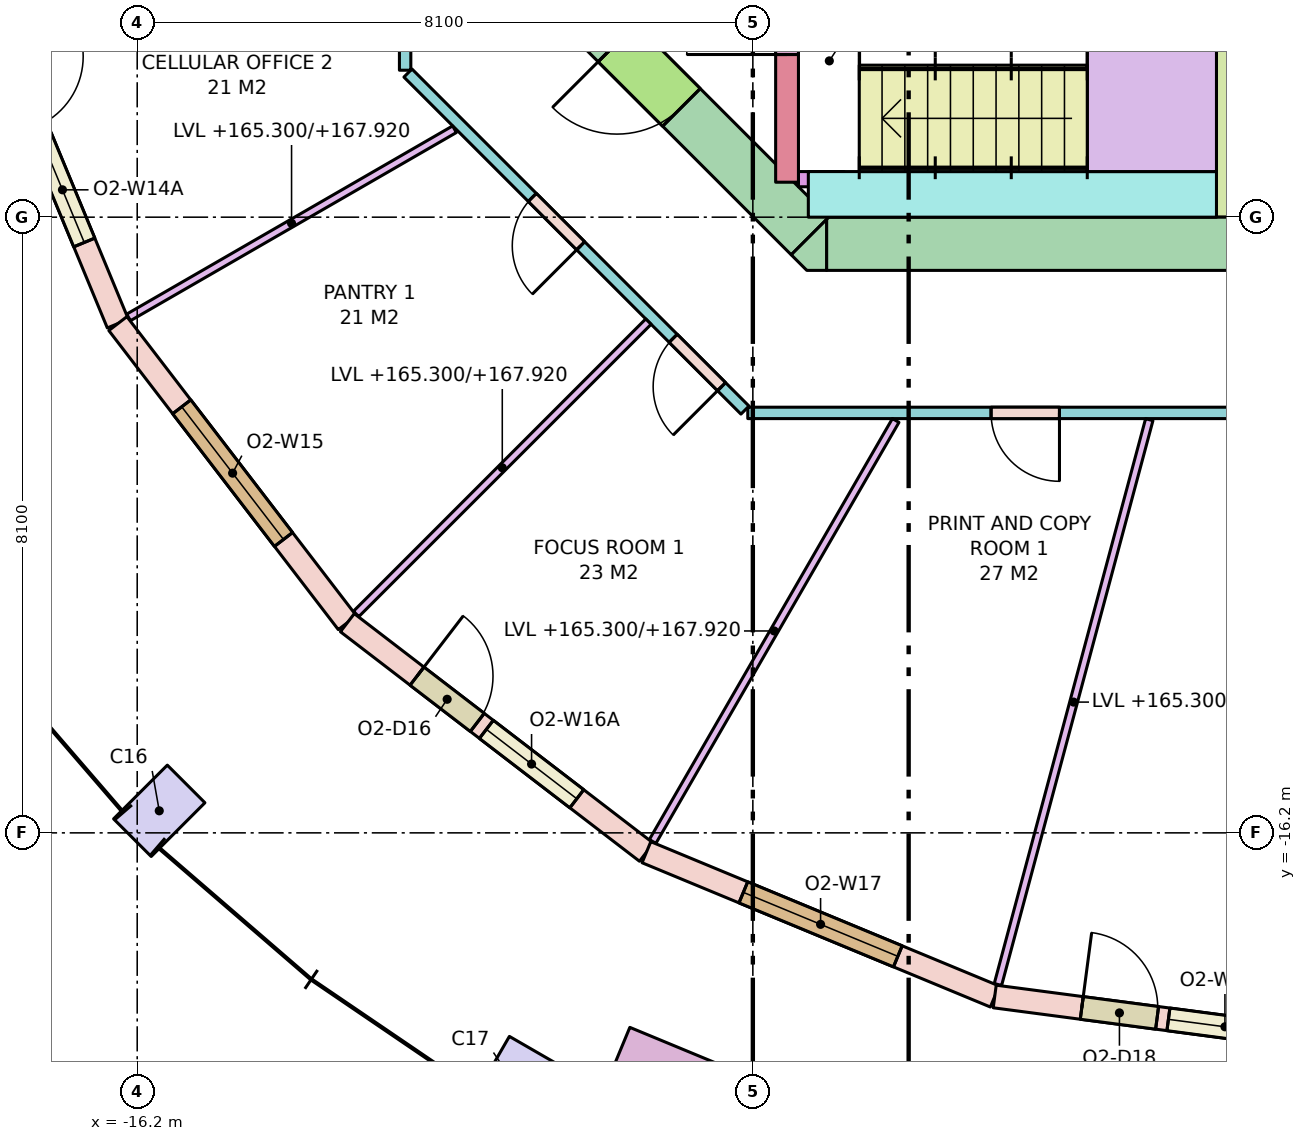
"""IFC4 building model, lengths in metres.
Left out: names, types, materials, properties, quantities, classifications, styles, units other than length and angle.
Written with IfcOpenShell. Run it as: python <this file> out.ifc"""

import sys

from ifc_helpers import new_model, si_unit, direction, frame, frame_2d, origin, origin_2d, place, context, subcontext, project, spatial, polyline, rectangle, outline, extrude, element, fill, save


model = new_model("IFC4")
c1 = context("Model", 3, precision=1e-05, world=origin(), true_north=direction((0.0, 1.0)))
c2 = subcontext(c1, "Body", "Model", "MODEL_VIEW")
j1 = project(units=[si_unit("LENGTHUNIT", "METRE"), si_unit("PLANEANGLEUNIT", "RADIAN")], contexts=[c1])
p1 = place(None, origin())
s1 = spatial("IfcSite", under=j1, at=p1, CompositionType="ELEMENT")
p2 = place(p1, origin())
s2 = spatial("IfcBuilding", under=s1, at=p2, CompositionType="ELEMENT")
p3 = place(p2, frame((0.0, 0.0, 165.3)))
s3 = spatial("IfcBuildingStorey", under=s2, at=p3, CompositionType="ELEMENT", Elevation=165.3)
for number, where, z_axis, x_axis in (
    (1, (-15.91, -15.91, 0.0), (0.0, 0.0, 1.0), (0.707, -0.707, 0.0)),
    (2, (-11.25, -19.486, 0.0), (0.0, 0.0, 1.0), (0.866, -0.5, 0.0)),
):
    element("IfcColumn", number, at=place(p3, frame(where, z_axis=z_axis, x_axis=x_axis)), inside=s3, PredefinedType="COLUMN", context=c2, shape_type="SweptSolid", body=[
        extrude(rectangle(XDim=0.7, YDim=1.0, at=origin_2d()), origin(), (0.0, 0.0, 1.0), 3.7),
    ])
p4 = place(p3, frame((-7.13, -8.45, -0.28), z_axis=(0.0, 0.0, 1.0), x_axis=(1.0, 0.0, 0.0)))
e3 = element("IfcWall", 3, at=p4, inside=s3, PredefinedType="SHEAR", context=c2, shape_type="SweptSolid", body=[
    extrude(rectangle(XDim=14.26, YDim=0.7, at=frame_2d((7.13, 0.0))), origin(), (0.0, 0.0, 1.0), 3.7),
])
p5 = place(p4, frame((8.08, 0.0, 0.28)))
e4 = element("IfcOpeningElement", 4, at=p5, cuts=e3, PredefinedType="OPENING", context=c2, shape_type="SweptSolid", body=[
    extrude(rectangle(XDim=0.7, YDim=2.1, at=frame_2d((0.35, 1.05))), frame((0.0, 0.36, 0.0), z_axis=(0.0, -1.0, 0.0), x_axis=(1.0, 0.0, 0.0)), (0.0, 0.0, 1.0), 0.72),
])
p6 = place(p4, frame((5.58, 0.0, 0.28)))
e5 = element("IfcOpeningElement", 5, at=p6, cuts=e3, PredefinedType="OPENING", context=c2, shape_type="SweptSolid", body=[
    extrude(rectangle(XDim=0.85, YDim=2.1, at=frame_2d((0.425, 1.05))), frame((0.0, 0.36, 0.0), z_axis=(0.0, -1.0, 0.0), x_axis=(1.0, 0.0, 0.0)), (0.0, 0.0, 1.0), 0.72),
])
p7 = place(p4, frame((6.88, 0.0, 0.28)))
e6 = element("IfcOpeningElement", 6, at=p7, cuts=e3, PredefinedType="OPENING", context=c2, shape_type="SweptSolid", body=[
    extrude(rectangle(XDim=0.85, YDim=2.1, at=frame_2d((0.425, 1.05))), frame((0.0, 0.36, 0.0), z_axis=(0.0, -1.0, 0.0), x_axis=(1.0, 0.0, 0.0)), (0.0, 0.0, 1.0), 0.72),
])
p8 = place(p4, frame((9.521, 0.0, 0.28)))
e7 = element("IfcOpeningElement", 7, at=p8, cuts=e3, PredefinedType="OPENING", context=c2, shape_type="SweptSolid", body=[
    extrude(rectangle(XDim=0.9, YDim=2.1, at=frame_2d((0.45, 1.05))), frame((0.0, 0.36, 0.0), z_axis=(0.0, -1.0, 0.0), x_axis=(1.0, 0.0, 0.0)), (0.0, 0.0, 1.0), 0.72),
])
p9 = place(p4, frame((11.278, 0.0, 0.28)))
e8 = element("IfcOpeningElement", 8, at=p9, cuts=e3, PredefinedType="OPENING", context=c2, shape_type="SweptSolid", body=[
    extrude(rectangle(XDim=0.9, YDim=2.1, at=frame_2d((0.45, 1.05))), frame((0.0, 0.36, 0.0), z_axis=(0.0, -1.0, 0.0), x_axis=(1.0, 0.0, 0.0)), (0.0, 0.0, 1.0), 0.72),
])
p10 = place(p4, frame((12.84, 0.0, 0.28)))
e9 = element("IfcOpeningElement", 9, at=p10, cuts=e3, PredefinedType="OPENING", context=c2, shape_type="SweptSolid", body=[
    extrude(rectangle(XDim=0.9, YDim=2.1, at=frame_2d((0.45, 1.05))), frame((0.0, 0.36, 0.0), z_axis=(0.0, -1.0, 0.0), x_axis=(1.0, 0.0, 0.0)), (0.0, 0.0, 1.0), 0.72),
])
p11 = place(p3, frame((-7.347, -8.347, -0.28), z_axis=(0.0, 0.0, 1.0), x_axis=(-0.707106781187, 0.707106781187, 0.0)))
e10 = element("IfcWall", 10, at=p11, inside=s3, PredefinedType="SHEAR", context=c2, shape_type="SweptSolid", body=[
    extrude(rectangle(XDim=4.243, YDim=0.7, at=frame_2d((2.121, 0.0))), origin(), (0.0, 0.0, 1.0), 3.7),
])
p12 = place(p11, frame((2.393, 0.0, 0.28)))
e11 = element("IfcOpeningElement", 11, at=p12, cuts=e10, PredefinedType="OPENING", context=c2, shape_type="SweptSolid", body=[
    extrude(rectangle(XDim=1.2, YDim=2.1, at=frame_2d((0.6, 1.05))), frame((0.0, 0.36, 0.0), z_axis=(0.0, -1.0, 0.0), x_axis=(1.0, 0.0, 0.0)), (0.0, 0.0, 1.0), 0.72),
])
p13 = place(p3, frame((0.0, 0.0, -0.28)))
e12 = element("IfcWall", 12, at=p13, inside=s3, PredefinedType="SHEAR", context=c2, shape_type="SweptSolid", body=[
    extrude(outline(polyline([(-7.39, -8.8), (-7.595, -8.595), (-7.595, -8.595), (-7.595, -8.595), (-7.13, -8.13), (-7.13, -8.8), (-7.13, -8.8), (-7.39, -8.8)])), origin(), (0.0, 0.0, 1.0), 3.7),
])
p14 = place(p3, frame((-1.85, -8.1, 0.0), z_axis=(0.0, 0.0, 1.0), x_axis=(0.0, 1.0, 0.0)))
e13 = element("IfcWall", 13, at=p14, inside=s3, PredefinedType="SHEAR", context=c2, shape_type="SweptSolid", body=[
    extrude(rectangle(XDim=6.6, YDim=0.3, at=frame_2d((3.3, 0.0))), origin(), (0.0, 0.0, 1.0), 3.42),
])
p15 = place(p3, frame((-7.65, -7.64, 0.0), z_axis=(0.0, 0.0, 1.0), x_axis=(0.0, 1.0, 0.0)))
e14 = element("IfcWall", 14, at=p15, inside=s3, PredefinedType="SHEAR", context=c2, shape_type="SweptSolid", body=[
    extrude(rectangle(XDim=3.14, YDim=0.3, at=frame_2d((1.57, 0.0))), origin(), (0.0, 0.0, 1.0), 3.42),
])
p16 = place(p15, frame((1.68, 0.0, 0.0)))
e15 = element("IfcOpeningElement", 15, at=p16, cuts=e14, PredefinedType="OPENING", context=c2, shape_type="SweptSolid", body=[
    extrude(rectangle(XDim=1.32, YDim=2.1, at=frame_2d((0.66, 1.05))), frame((0.0, 0.16, 0.0), z_axis=(0.0, -1.0, 0.0), x_axis=(1.0, 0.0, 0.0)), (0.0, 0.0, 1.0), 0.32),
])
p17 = place(p3, frame((-7.5, -7.6, 0.0), z_axis=(0.0, 0.0, 1.0), x_axis=(1.0, 0.0, 0.0)))
e16 = element("IfcWall", 16, at=p17, inside=s3, PredefinedType="SHEAR", context=c2, shape_type="SweptSolid", body=[
    extrude(rectangle(XDim=0.6, YDim=0.2, at=frame_2d((0.3, 0.0))), origin(), (0.0, 0.0, 1.0), 3.42),
])
p18 = place(p3, frame((-7.37, -7.8, 0.0), z_axis=(0.0, 0.0, 1.0), x_axis=(1.0, 0.0, 0.0)))
e17 = element("IfcWall", 17, at=p18, inside=s3, PredefinedType="SHEAR", context=c2, shape_type="SweptSolid", body=[
    extrude(rectangle(XDim=5.37, YDim=0.6, at=frame_2d((2.685, 0.0))), origin(), (0.0, 0.0, 1.0), 3.42),
])
p19 = place(p3, frame((-18.353, -4.917, 0.0), z_axis=(0.0, 0.0, 1.0), x_axis=(0.382650301762, -0.923893254961, 0.0)))
e18 = element("IfcWall", 18, at=p19, inside=s3, PredefinedType="STANDARD", context=c2, shape_type="SweptSolid", body=[
    extrude(rectangle(XDim=4.96, YDim=0.3, at=frame_2d((2.48, 0.0))), origin(), (0.0, 0.0, 1.0), 3.42),
])
p20 = place(p19, frame((1.155, 0.0, 0.0)))
e19 = element("IfcOpeningElement", 19, at=p20, cuts=e18, PredefinedType="OPENING", context=c2, shape_type="SweptSolid", body=[
    extrude(rectangle(XDim=1.0, YDim=2.4, at=frame_2d((0.5, 1.2))), frame((0.0, 0.16, 0.0), z_axis=(0.0, -1.0, 0.0), x_axis=(1.0, 0.0, 0.0)), (0.0, 0.0, 1.0), 0.32),
])
p21 = place(p19, frame((2.305, 0.0, 0.8)))
e20 = element("IfcOpeningElement", 20, at=p21, cuts=e18, PredefinedType="OPENING", context=c2, shape_type="SweptSolid", body=[
    extrude(rectangle(XDim=1.5, YDim=2.4, at=frame_2d((0.75, 1.2))), frame((0.0, 0.16, 0.0), z_axis=(0.0, -1.0, 0.0), x_axis=(1.0, 0.0, 0.0)), (0.0, 0.0, 1.0), 0.32),
])
p22 = place(p3, frame((-16.455, -9.5, 0.0), z_axis=(0.0, 0.0, 1.0), x_axis=(0.608768356425, -0.793348024649, 0.0)))
e21 = element("IfcWall", 21, at=p22, inside=s3, PredefinedType="STANDARD", context=c2, shape_type="SweptSolid", body=[
    extrude(rectangle(XDim=4.96, YDim=0.3, at=frame_2d((2.48, 0.0))), origin(), (0.0, 0.0, 1.0), 3.42),
])
p23 = place(p22, frame((1.38, 0.0, 0.8)))
e22 = element("IfcOpeningElement", 22, at=p23, cuts=e21, PredefinedType="OPENING", context=c2, shape_type="SweptSolid", body=[
    extrude(rectangle(XDim=2.2, YDim=2.4, at=frame_2d((1.1, 1.2))), frame((0.0, 0.16, 0.0), z_axis=(0.0, -1.0, 0.0), x_axis=(1.0, 0.0, 0.0)), (0.0, 0.0, 1.0), 0.32),
])
p24 = place(p3, frame((-13.435, -13.435, 0.0), z_axis=(0.0, 0.0, 1.0), x_axis=(0.793348024649, -0.608768356425, 0.0)))
e23 = element("IfcWall", 23, at=p24, inside=s3, PredefinedType="STANDARD", context=c2, shape_type="SweptSolid", body=[
    extrude(rectangle(XDim=4.96, YDim=0.3, at=frame_2d((2.48, 0.0))), origin(), (0.0, 0.0, 1.0), 3.42),
])
p25 = place(p24, frame((1.155, 0.0, 0.0)))
e24 = element("IfcOpeningElement", 24, at=p25, cuts=e23, PredefinedType="OPENING", context=c2, shape_type="SweptSolid", body=[
    extrude(rectangle(XDim=1.0, YDim=2.4, at=frame_2d((0.5, 1.2))), frame((0.0, 0.16, 0.0), z_axis=(0.0, -1.0, 0.0), x_axis=(1.0, 0.0, 0.0)), (0.0, 0.0, 1.0), 0.32),
])
p26 = place(p24, frame((2.305, 0.0, 0.8)))
e25 = element("IfcOpeningElement", 25, at=p26, cuts=e23, PredefinedType="OPENING", context=c2, shape_type="SweptSolid", body=[
    extrude(rectangle(XDim=1.5, YDim=2.4, at=frame_2d((0.75, 1.2))), frame((0.0, 0.16, 0.0), z_axis=(0.0, -1.0, 0.0), x_axis=(1.0, 0.0, 0.0)), (0.0, 0.0, 1.0), 0.32),
])
p27 = place(p3, frame((-9.5, -16.455, 0.0), z_axis=(0.0, 0.0, 1.0), x_axis=(0.923893254961, -0.382650301762, 0.0)))
e26 = element("IfcWall", 26, at=p27, inside=s3, PredefinedType="STANDARD", context=c2, shape_type="SweptSolid", body=[
    extrude(rectangle(XDim=4.96, YDim=0.3, at=frame_2d((2.48, 0.0))), origin(), (0.0, 0.0, 1.0), 3.42),
])
p28 = place(p27, frame((1.38, 0.0, 0.8)))
e27 = element("IfcOpeningElement", 27, at=p28, cuts=e26, PredefinedType="OPENING", context=c2, shape_type="SweptSolid", body=[
    extrude(rectangle(XDim=2.2, YDim=2.4, at=frame_2d((1.1, 1.2))), frame((0.0, 0.16, 0.0), z_axis=(0.0, -1.0, 0.0), x_axis=(1.0, 0.0, 0.0)), (0.0, 0.0, 1.0), 0.32),
])
p29 = place(p3, frame((-4.917, -18.353, 0.0), z_axis=(0.0, 0.0, 1.0), x_axis=(0.991443234469, -0.130538549191, 0.0)))
e28 = element("IfcWall", 28, at=p29, inside=s3, PredefinedType="STANDARD", context=c2, shape_type="SweptSolid", body=[
    extrude(rectangle(XDim=4.96, YDim=0.3, at=frame_2d((2.48, 0.0))), origin(), (0.0, 0.0, 1.0), 3.42),
])
p30 = place(p29, frame((1.155, 0.0, 0.0)))
e29 = element("IfcOpeningElement", 29, at=p30, cuts=e28, PredefinedType="OPENING", context=c2, shape_type="SweptSolid", body=[
    extrude(rectangle(XDim=1.0, YDim=2.4, at=frame_2d((0.5, 1.2))), frame((0.0, 0.16, 0.0), z_axis=(0.0, -1.0, 0.0), x_axis=(1.0, 0.0, 0.0)), (0.0, 0.0, 1.0), 0.32),
])
p31 = place(p29, frame((2.305, 0.0, 0.8)))
e30 = element("IfcOpeningElement", 30, at=p31, cuts=e28, PredefinedType="OPENING", context=c2, shape_type="SweptSolid", body=[
    extrude(rectangle(XDim=1.5, YDim=2.4, at=frame_2d((0.75, 1.2))), frame((0.0, 0.16, 0.0), z_axis=(0.0, -1.0, 0.0), x_axis=(1.0, 0.0, 0.0)), (0.0, 0.0, 1.0), 0.32),
])
p32 = place(p3, frame((-9.814, -18.99, 0.0), z_axis=(0.0, 0.0, 1.0), x_axis=(0.923875488976, -0.382693194178, 0.0)))
e31 = element("IfcWall", 31, at=p32, inside=s3, PredefinedType="PARAPET", context=c2, shape_type="SweptSolid", body=[
    extrude(rectangle(XDim=3.6, YDim=0.5, at=frame_2d((1.8, 0.0))), origin(), (0.0, 0.0, 1.0), 0.9),
])
p33 = place(p3, frame((8.167, -10.675, 0.0), z_axis=(0.0, 0.0, 1.0), x_axis=(-1.0, 0.0, 0.0)))
e32 = element("IfcWall", 32, at=p33, inside=s3, PredefinedType="PARTITIONING", context=c2, shape_type="SweptSolid", body=[
    extrude(rectangle(XDim=16.333, YDim=0.15, at=frame_2d((8.167, 0.0))), origin(), (0.0, 0.0, 1.0), 2.62),
])
p34 = place(p33, frame((12.232, 0.0, 0.0)))
e33 = element("IfcOpeningElement", 33, at=p34, cuts=e32, PredefinedType="OPENING", context=c2, shape_type="SweptSolid", body=[
    extrude(rectangle(XDim=0.9, YDim=2.1, at=frame_2d((0.45, 1.05))), frame((0.0, 0.085, 0.0), z_axis=(0.0, -1.0, 0.0), x_axis=(1.0, 0.0, 0.0)), (0.0, 0.0, 1.0), 0.17),
])
p35 = place(p33, frame((4.639, 0.0, 0.0)))
e34 = element("IfcOpeningElement", 34, at=p35, cuts=e32, PredefinedType="OPENING", context=c2, shape_type="SweptSolid", body=[
    extrude(rectangle(XDim=1.8, YDim=2.1, at=frame_2d((0.9, 1.05))), frame((0.0, 0.085, 0.0), z_axis=(0.0, -1.0, 0.0), x_axis=(1.0, 0.0, 0.0)), (0.0, 0.0, 1.0), 0.17),
])
p36 = place(p3, frame((-8.204, -10.638, 0.0), z_axis=(0.0, 0.0, 1.0), x_axis=(-0.707106781187, 0.707106781187, 0.0)))
e35 = element("IfcWall", 35, at=p36, inside=s3, PredefinedType="PARTITIONING", context=c2, shape_type="SweptSolid", body=[
    extrude(rectangle(XDim=6.271, YDim=0.15, at=frame_2d((3.135, 0.0))), origin(), (0.0, 0.0, 1.0), 2.62),
])
p37 = place(p36, frame((3.057, 0.0, 0.0)))
e36 = element("IfcOpeningElement", 36, at=p37, cuts=e35, PredefinedType="OPENING", context=c2, shape_type="SweptSolid", body=[
    extrude(rectangle(XDim=0.9, YDim=2.1, at=frame_2d((0.45, 1.05))), frame((0.0, 0.085, 0.0), z_axis=(0.0, -1.0, 0.0), x_axis=(1.0, 0.0, 0.0)), (0.0, 0.0, 1.0), 0.17),
])
p38 = place(p36, frame((0.436, 0.0, 0.0)))
e37 = element("IfcOpeningElement", 37, at=p38, cuts=e35, PredefinedType="OPENING", context=c2, shape_type="SweptSolid", body=[
    extrude(rectangle(XDim=0.9, YDim=2.1, at=frame_2d((0.45, 1.05))), frame((0.0, 0.085, 0.0), z_axis=(0.0, -1.0, 0.0), x_axis=(1.0, 0.0, 0.0)), (0.0, 0.0, 1.0), 0.17),
])
p39 = place(p3, frame((-12.675, -6.167, 0.0), z_axis=(0.0, 0.0, 1.0), x_axis=(0.0, 1.0, 0.0)))
e38 = element("IfcWall", 38, at=p39, inside=s3, PredefinedType="PARTITIONING", context=c2, shape_type="SweptSolid", body=[
    extrude(rectangle(XDim=12.333, YDim=0.15, at=frame_2d((6.167, 0.0))), origin(), (0.0, 0.0, 1.0), 2.62),
])
p40 = place(p39, frame((10.473, 0.0, 0.0)))
e39 = element("IfcOpeningElement", 39, at=p40, cuts=e38, PredefinedType="OPENING", context=c2, shape_type="SweptSolid", body=[
    extrude(rectangle(XDim=0.9, YDim=2.1, at=frame_2d((0.45, 1.05))), frame((0.0, 0.085, 0.0), z_axis=(0.0, -1.0, 0.0), x_axis=(1.0, 0.0, 0.0)), (0.0, 0.0, 1.0), 0.17),
])
p41 = place(p39, frame((7.416, 0.0, 0.0)))
e40 = element("IfcOpeningElement", 40, at=p41, cuts=e38, PredefinedType="OPENING", context=c2, shape_type="SweptSolid", body=[
    extrude(rectangle(XDim=0.9, YDim=2.1, at=frame_2d((0.45, 1.05))), frame((0.0, 0.085, 0.0), z_axis=(0.0, -1.0, 0.0), x_axis=(1.0, 0.0, 0.0)), (0.0, 0.0, 1.0), 0.17),
])
p42 = place(p39, frame((4.018, 0.0, 0.0)))
e41 = element("IfcOpeningElement", 41, at=p42, cuts=e38, PredefinedType="OPENING", context=c2, shape_type="SweptSolid", body=[
    extrude(rectangle(XDim=0.9, YDim=2.1, at=frame_2d((0.45, 1.05))), frame((0.0, 0.085, 0.0), z_axis=(0.0, -1.0, 0.0), x_axis=(1.0, 0.0, 0.0)), (0.0, 0.0, 1.0), 0.17),
])
p43 = place(p39, frame((0.96, 0.0, 0.0)))
e42 = element("IfcOpeningElement", 42, at=p43, cuts=e38, PredefinedType="OPENING", context=c2, shape_type="SweptSolid", body=[
    extrude(rectangle(XDim=0.9, YDim=2.1, at=frame_2d((0.45, 1.05))), frame((0.0, 0.085, 0.0), z_axis=(0.0, -1.0, 0.0), x_axis=(1.0, 0.0, 0.0)), (0.0, 0.0, 1.0), 0.17),
])
p44 = place(p3, frame((-12.025, -6.943, 0.0), z_axis=(0.0, 0.0, 1.0), x_axis=(-0.866025463095, -0.499999897272, 0.0)))
e43 = element("IfcWall", 43, at=p44, inside=s3, PredefinedType="PARTITIONING", context=c2, shape_type="SweptSolid", body=[
    extrude(rectangle(XDim=4.951, YDim=0.1, at=frame_2d((2.476, 0.0))), origin(), (0.0, 0.0, 1.0), 2.62),
])
p45 = place(p3, frame((-9.474, -9.474, 0.0), z_axis=(0.0, 0.0, 1.0), x_axis=(-0.707106781187, -0.707106781187, 0.0)))
e44 = element("IfcWall", 44, at=p45, inside=s3, PredefinedType="PARTITIONING", context=c2, shape_type="SweptSolid", body=[
    extrude(rectangle(XDim=5.439, YDim=0.1, at=frame_2d((2.719, 0.0))), origin(), (0.0, 0.0, 1.0), 2.62),
])
p46 = place(p3, frame((-6.221, -10.775, 0.0), z_axis=(0.0, 0.0, 1.0), x_axis=(-0.500023166934, -0.866012027936, 0.0)))
e45 = element("IfcWall", 45, at=p46, inside=s3, PredefinedType="PARTITIONING", context=c2, shape_type="SweptSolid", body=[
    extrude(rectangle(XDim=6.395, YDim=0.1, at=frame_2d((3.198, 0.0))), origin(), (0.0, 0.0, 1.0), 2.62),
])
p47 = place(p3, frame((-2.884, -10.764, 0.0), z_axis=(0.0, 0.0, 1.0), x_axis=(-0.25881804804, -0.965926093451, 0.0)))
e46 = element("IfcWall", 46, at=p47, inside=s3, PredefinedType="PARTITIONING", context=c2, shape_type="SweptSolid", body=[
    extrude(rectangle(XDim=7.693, YDim=0.1, at=frame_2d((3.846, 0.0))), origin(), (0.0, 0.0, 1.0), 2.62),
])
p48 = place(p21, origin())
e47 = element("IfcWindow", 47, at=p48, inside=s3, PartitioningType="SINGLE_PANEL", PredefinedType="WINDOW", context=c2, shape_type="SweptSolid", body=[
    extrude(rectangle(XDim=1.5, YDim=2.4, at=frame_2d((0.75, 1.2))), frame((0.0, 0.03, 0.0), z_axis=(0.0, -1.0, 0.0), x_axis=(1.0, 0.0, 0.0)), (0.0, 0.0, 1.0), 0.06),
])
fill(e20, e47)
p49 = place(p23, origin())
e48 = element("IfcWindow", 48, at=p49, inside=s3, PartitioningType="SINGLE_PANEL", PredefinedType="WINDOW", context=c2, shape_type="SweptSolid", body=[
    extrude(rectangle(XDim=2.2, YDim=2.4, at=frame_2d((1.1, 1.2))), frame((0.0, 0.03, 0.0), z_axis=(0.0, -1.0, 0.0), x_axis=(1.0, 0.0, 0.0)), (0.0, 0.0, 1.0), 0.06),
])
fill(e22, e48)
p50 = place(p25, origin())
e49 = element("IfcDoor", 49, at=p50, inside=s3, OperationType="SINGLE_SWING_LEFT", PredefinedType="DOOR", context=c2, shape_type="SweptSolid", body=[
    extrude(rectangle(XDim=1.0, YDim=2.4, at=frame_2d((0.5, 1.2))), frame((0.0, 0.025, 0.0), z_axis=(0.0, -1.0, 0.0), x_axis=(1.0, 0.0, 0.0)), (0.0, 0.0, 1.0), 0.05),
])
fill(e24, e49)
p51 = place(p26, origin())
e50 = element("IfcWindow", 50, at=p51, inside=s3, PartitioningType="SINGLE_PANEL", PredefinedType="WINDOW", context=c2, shape_type="SweptSolid", body=[
    extrude(rectangle(XDim=1.5, YDim=2.4, at=frame_2d((0.75, 1.2))), frame((0.0, 0.03, 0.0), z_axis=(0.0, -1.0, 0.0), x_axis=(1.0, 0.0, 0.0)), (0.0, 0.0, 1.0), 0.06),
])
fill(e25, e50)
p52 = place(p28, origin())
e51 = element("IfcWindow", 51, at=p52, inside=s3, PartitioningType="SINGLE_PANEL", PredefinedType="WINDOW", context=c2, shape_type="SweptSolid", body=[
    extrude(rectangle(XDim=2.2, YDim=2.4, at=frame_2d((1.1, 1.2))), frame((0.0, 0.03, 0.0), z_axis=(0.0, -1.0, 0.0), x_axis=(1.0, 0.0, 0.0)), (0.0, 0.0, 1.0), 0.06),
])
fill(e27, e51)
p53 = place(p30, origin())
e52 = element("IfcDoor", 52, at=p53, inside=s3, OperationType="SINGLE_SWING_LEFT", PredefinedType="DOOR", context=c2, shape_type="SweptSolid", body=[
    extrude(rectangle(XDim=1.0, YDim=2.4, at=frame_2d((0.5, 1.2))), frame((0.0, 0.025, 0.0), z_axis=(0.0, -1.0, 0.0), x_axis=(1.0, 0.0, 0.0)), (0.0, 0.0, 1.0), 0.05),
])
fill(e29, e52)
p54 = place(p31, origin())
e53 = element("IfcWindow", 53, at=p54, inside=s3, PartitioningType="SINGLE_PANEL", PredefinedType="WINDOW", context=c2, shape_type="SweptSolid", body=[
    extrude(rectangle(XDim=1.5, YDim=2.4, at=frame_2d((0.75, 1.2))), frame((0.0, 0.03, 0.0), z_axis=(0.0, -1.0, 0.0), x_axis=(1.0, 0.0, 0.0)), (0.0, 0.0, 1.0), 0.06),
])
fill(e30, e53)
p55 = place(p16, origin())
e54 = element("IfcDoor", 54, at=p55, inside=s3, OperationType="DOUBLE_DOOR_SINGLE_SWING", PredefinedType="DOOR", context=c2, shape_type="SweptSolid", body=[
    extrude(rectangle(XDim=1.32, YDim=2.1, at=frame_2d((0.66, 1.05))), frame((0.0, 0.025, 0.0), z_axis=(0.0, -1.0, 0.0), x_axis=(1.0, 0.0, 0.0)), (0.0, 0.0, 1.0), 0.05),
])
fill(e15, e54)
p56 = place(p12, origin())
e55 = element("IfcDoor", 55, at=p56, inside=s3, OperationType="SINGLE_SWING_RIGHT", PredefinedType="DOOR", context=c2, shape_type="SweptSolid", body=[
    extrude(rectangle(XDim=1.2, YDim=2.1, at=frame_2d((0.6, 1.05))), frame((0.0, 0.025, 0.0), z_axis=(0.0, -1.0, 0.0), x_axis=(1.0, 0.0, 0.0)), (0.0, 0.0, 1.0), 0.05),
])
fill(e11, e55)
p57 = place(p37, origin())
e56 = element("IfcDoor", 56, at=p57, inside=s3, OperationType="SINGLE_SWING_LEFT", PredefinedType="DOOR", context=c2, shape_type="SweptSolid", body=[
    extrude(rectangle(XDim=0.9, YDim=2.1, at=frame_2d((0.45, 1.05))), frame((0.0, 0.025, 0.0), z_axis=(0.0, -1.0, 0.0), x_axis=(1.0, 0.0, 0.0)), (0.0, 0.0, 1.0), 0.05),
])
fill(e36, e56)
p58 = place(p38, origin())
e57 = element("IfcDoor", 57, at=p58, inside=s3, OperationType="SINGLE_SWING_LEFT", PredefinedType="DOOR", context=c2, shape_type="SweptSolid", body=[
    extrude(rectangle(XDim=0.9, YDim=2.1, at=frame_2d((0.45, 1.05))), frame((0.0, 0.025, 0.0), z_axis=(0.0, -1.0, 0.0), x_axis=(1.0, 0.0, 0.0)), (0.0, 0.0, 1.0), 0.05),
])
fill(e37, e57)
p59 = place(p34, origin())
e58 = element("IfcDoor", 58, at=p59, inside=s3, OperationType="SINGLE_SWING_LEFT", PredefinedType="DOOR", context=c2, shape_type="SweptSolid", body=[
    extrude(rectangle(XDim=0.9, YDim=2.1, at=frame_2d((0.45, 1.05))), frame((0.0, 0.025, 0.0), z_axis=(0.0, -1.0, 0.0), x_axis=(1.0, 0.0, 0.0)), (0.0, 0.0, 1.0), 0.05),
])
fill(e33, e58)
save(model, sys.argv[1])
